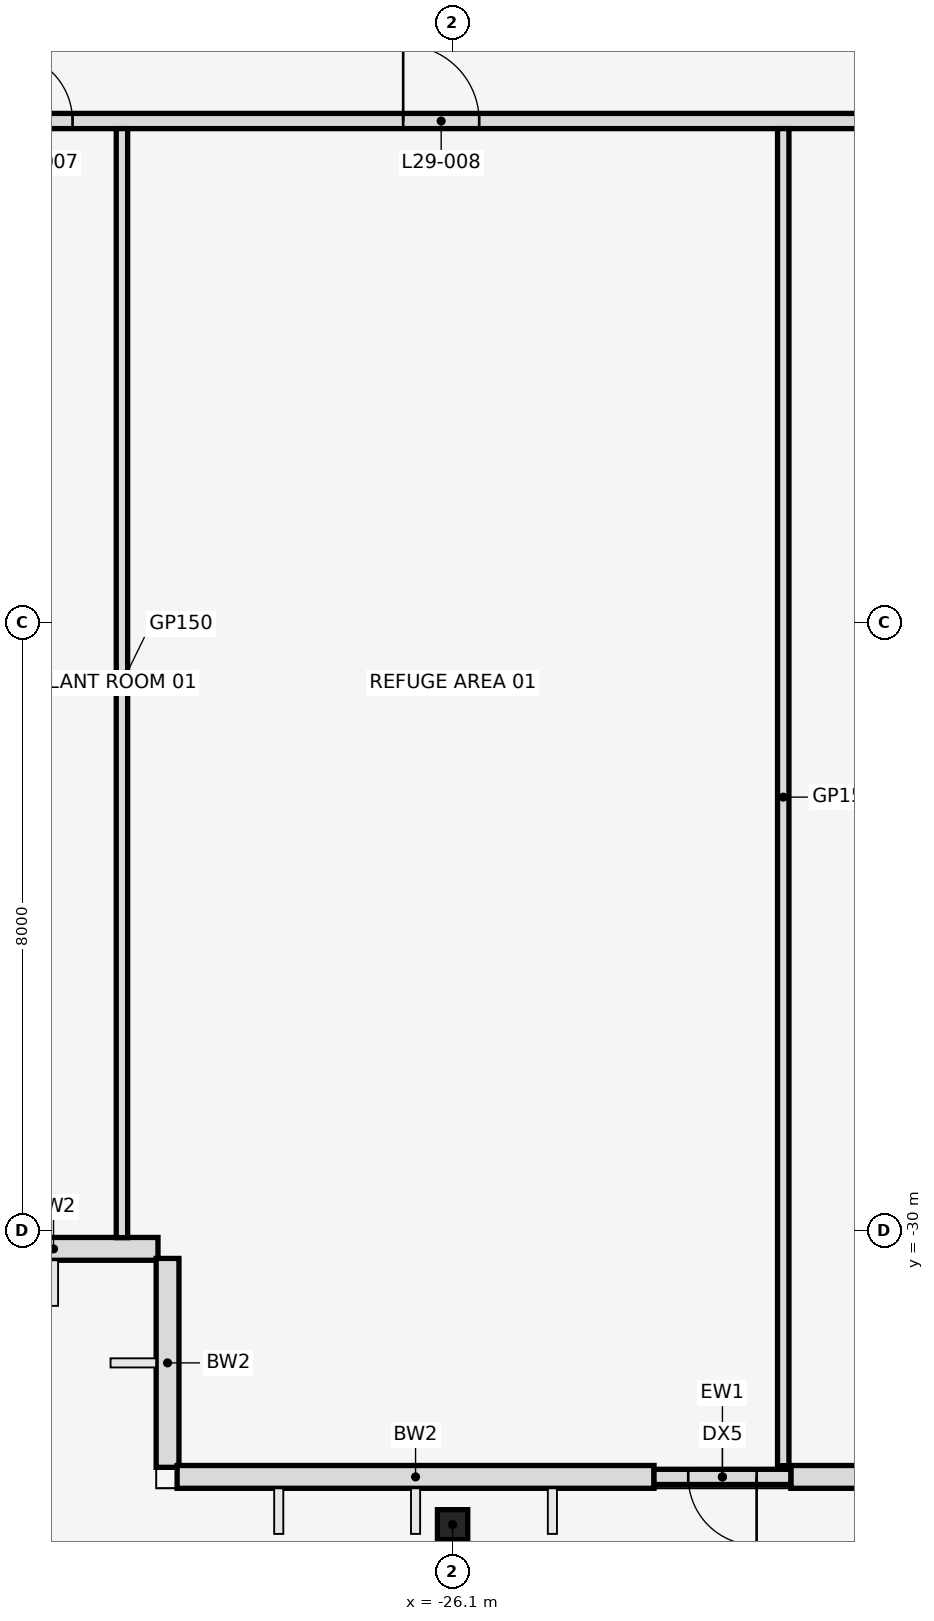
"""IFC4 building model, lengths in metres.
Left out: names, types, materials, properties, quantities, classifications, styles, units other than length and angle.
Written with IfcOpenShell. Run it as: python <this file> out.ifc"""

import sys

from ifc_helpers import new_model, si_unit, direction, frame, frame_2d, origin, origin_2d, place, context, subcontext, project, spatial, rectangle, i_section, extrude, element, fill, save


model = new_model("IFC4")
c1 = context("Model", 3, precision=1e-05, world=origin(), true_north=direction((0.0, 1.0)))
c2 = subcontext(c1, "Body", "Model", "MODEL_VIEW")
j1 = project(units=[si_unit("LENGTHUNIT", "METRE"), si_unit("PLANEANGLEUNIT", "RADIAN")], contexts=[c1])
p1 = place(None, origin())
s1 = spatial("IfcSite", under=j1, at=p1, CompositionType="ELEMENT")
p2 = place(p1, origin())
s2 = spatial("IfcBuilding", under=s1, at=p2, CompositionType="ELEMENT")
p3 = place(p2, frame((0.0, 0.0, 135.0)))
s3 = spatial("IfcBuildingStorey", under=s2, at=p3, CompositionType="ELEMENT", Elevation=135.0)
p4 = place(p3, frame((-26.1, -33.866, 0.0), z_axis=(0.0, 0.0, 1.0), x_axis=(1.0, 0.0, 0.0)))
e1 = element("IfcColumn", 1, at=p4, inside=s3, PredefinedType="COLUMN", context=c2, shape_type="SweptSolid", body=[
    extrude(i_section(OverallWidth=0.399, OverallDepth=0.394, WebThickness=0.023, FlangeThickness=0.037, at=origin_2d()), origin(), (0.0, 0.0, 1.0), 5.4),
])
p5 = place(p3, frame((-32.724, -30.238, 0.0), z_axis=(0.0, 0.0, 1.0), x_axis=(1.0, 0.0, 0.0)))
e2 = element("IfcWall", 2, at=p5, inside=s3, PredefinedType="STANDARD", context=c2, shape_type="SweptSolid", body=[
    extrude(rectangle(XDim=2.748, YDim=0.3, at=frame_2d((1.374, 0.0))), origin(), (0.0, 0.0, 1.0), 4.28),
])
p6 = place(p3, frame((-29.85, -30.364, 0.0), z_axis=(0.0, 0.0, 1.0), x_axis=(0.0, -1.0, 0.0)))
e3 = element("IfcWall", 3, at=p6, inside=s3, PredefinedType="STANDARD", context=c2, shape_type="SweptSolid", body=[
    extrude(rectangle(XDim=2.748, YDim=0.3, at=frame_2d((1.374, 0.0))), origin(), (0.0, 0.0, 1.0), 4.28),
])
p7 = place(p3, frame((-29.724, -33.238, 0.0), z_axis=(0.0, 0.0, 1.0), x_axis=(1.0, 0.0, 0.0)))
e4 = element("IfcWall", 4, at=p7, inside=s3, PredefinedType="STANDARD", context=c2, shape_type="SweptSolid", body=[
    extrude(rectangle(XDim=6.274, YDim=0.3, at=frame_2d((3.137, 0.0))), origin(), (0.0, 0.0, 1.0), 4.28),
])
p8 = place(p3, frame((-21.65, -33.238, 0.0), z_axis=(0.0, 0.0, 1.0), x_axis=(1.0, 0.0, 0.0)))
e5 = element("IfcWall", 5, at=p8, inside=s3, PredefinedType="STANDARD", context=c2, shape_type="SweptSolid", body=[
    extrude(rectangle(XDim=6.035, YDim=0.3, at=frame_2d((3.018, 0.0))), origin(), (0.0, 0.0, 1.0), 4.28),
])
p9 = place(p3, frame((-21.65, -33.238, 0.0), z_axis=(0.0, 0.0, 1.0), x_axis=(-1.0, 0.0, 0.0)))
e6 = element("IfcWall", 6, at=p9, inside=s3, PredefinedType="STANDARD", context=c2, shape_type="SweptSolid", body=[
    extrude(rectangle(XDim=1.8, YDim=0.2, at=frame_2d((0.9, 0.0))), origin(), (0.0, 0.0, 1.0), 5.25),
])
p10 = place(p9, frame((0.45, 0.0, 0.0)))
e7 = element("IfcOpeningElement", 7, at=p10, cuts=e6, PredefinedType="OPENING", context=c2, shape_type="SweptSolid", body=[
    extrude(rectangle(XDim=0.9, YDim=2.1, at=frame_2d((0.45, 1.05))), frame((0.0, 0.112, 0.0), z_axis=(0.0, -1.0, 0.0), x_axis=(1.0, 0.0, 0.0)), (0.0, 0.0, 1.0), 0.224),
])
p11 = place(p3, frame((-32.7, -15.4, 0.0), z_axis=(0.0, 0.0, 1.0), x_axis=(1.0, 0.0, 0.0)))
e8 = element("IfcWall", 8, at=p11, inside=s3, PredefinedType="PARTITIONING", context=c2, shape_type="SweptSolid", body=[
    extrude(rectangle(XDim=65.4, YDim=0.2, at=frame_2d((32.7, 0.0))), origin(), (0.0, 0.0, 1.0), 4.24),
])
p12 = place(p11, frame((0.7, 0.0, 0.0)))
e9 = element("IfcOpeningElement", 9, at=p12, cuts=e8, PredefinedType="OPENING", context=c2, shape_type="SweptSolid", body=[
    extrude(rectangle(XDim=0.9, YDim=2.1, at=frame_2d((0.45, 1.05))), frame((0.0, 0.112, 0.0), z_axis=(0.0, -1.0, 0.0), x_axis=(1.0, 0.0, 0.0)), (0.0, 0.0, 1.0), 0.224),
])
p13 = place(p11, frame((5.95, 0.0, 0.0)))
e10 = element("IfcOpeningElement", 10, at=p13, cuts=e8, PredefinedType="OPENING", context=c2, shape_type="SweptSolid", body=[
    extrude(rectangle(XDim=1.0, YDim=2.1, at=frame_2d((0.5, 1.05))), frame((0.0, 0.112, 0.0), z_axis=(0.0, -1.0, 0.0), x_axis=(1.0, 0.0, 0.0)), (0.0, 0.0, 1.0), 0.224),
])
p14 = place(p11, frame((14.85, 0.0, 0.0)))
e11 = element("IfcOpeningElement", 11, at=p14, cuts=e8, PredefinedType="OPENING", context=c2, shape_type="SweptSolid", body=[
    extrude(rectangle(XDim=1.0, YDim=2.1, at=frame_2d((0.5, 1.05))), frame((0.0, 0.112, 0.0), z_axis=(0.0, -1.0, 0.0), x_axis=(1.0, 0.0, 0.0)), (0.0, 0.0, 1.0), 0.224),
])
p15 = place(p11, frame((23.55, 0.0, 0.0)))
e12 = element("IfcOpeningElement", 12, at=p15, cuts=e8, PredefinedType="OPENING", context=c2, shape_type="SweptSolid", body=[
    extrude(rectangle(XDim=1.0, YDim=2.1, at=frame_2d((0.5, 1.05))), frame((0.0, 0.112, 0.0), z_axis=(0.0, -1.0, 0.0), x_axis=(1.0, 0.0, 0.0)), (0.0, 0.0, 1.0), 0.224),
])
p16 = place(p11, frame((34.4, 0.0, 0.0)))
e13 = element("IfcOpeningElement", 13, at=p16, cuts=e8, PredefinedType="OPENING", context=c2, shape_type="SweptSolid", body=[
    extrude(rectangle(XDim=1.0, YDim=2.1, at=frame_2d((0.5, 1.05))), frame((0.0, 0.112, 0.0), z_axis=(0.0, -1.0, 0.0), x_axis=(1.0, 0.0, 0.0)), (0.0, 0.0, 1.0), 0.224),
])
p17 = place(p11, frame((40.95, 0.0, 0.0)))
e14 = element("IfcOpeningElement", 14, at=p17, cuts=e8, PredefinedType="OPENING", context=c2, shape_type="SweptSolid", body=[
    extrude(rectangle(XDim=1.0, YDim=2.1, at=frame_2d((0.5, 1.05))), frame((0.0, 0.112, 0.0), z_axis=(0.0, -1.0, 0.0), x_axis=(1.0, 0.0, 0.0)), (0.0, 0.0, 1.0), 0.224),
])
p18 = place(p11, frame((49.65, 0.0, 0.0)))
e15 = element("IfcOpeningElement", 15, at=p18, cuts=e8, PredefinedType="OPENING", context=c2, shape_type="SweptSolid", body=[
    extrude(rectangle(XDim=0.9, YDim=2.1, at=frame_2d((0.45, 1.05))), frame((0.0, 0.112, 0.0), z_axis=(0.0, -1.0, 0.0), x_axis=(1.0, 0.0, 0.0)), (0.0, 0.0, 1.0), 0.224),
])
p19 = place(p11, frame((58.45, 0.0, 0.0)))
e16 = element("IfcOpeningElement", 16, at=p19, cuts=e8, PredefinedType="OPENING", context=c2, shape_type="SweptSolid", body=[
    extrude(rectangle(XDim=1.0, YDim=2.1, at=frame_2d((0.5, 1.05))), frame((0.0, 0.112, 0.0), z_axis=(0.0, -1.0, 0.0), x_axis=(1.0, 0.0, 0.0)), (0.0, 0.0, 1.0), 0.224),
])
p20 = place(p11, frame((63.85, 0.0, 0.0)))
e17 = element("IfcOpeningElement", 17, at=p20, cuts=e8, PredefinedType="OPENING", context=c2, shape_type="SweptSolid", body=[
    extrude(rectangle(XDim=0.9, YDim=2.1, at=frame_2d((0.45, 1.05))), frame((0.0, 0.112, 0.0), z_axis=(0.0, -1.0, 0.0), x_axis=(1.0, 0.0, 0.0)), (0.0, 0.0, 1.0), 0.224),
])
p21 = place(p3, frame((-30.45, -30.09, 0.0), z_axis=(0.0, 0.0, 1.0), x_axis=(0.0, 1.0, 0.0)))
e18 = element("IfcWall", 18, at=p21, inside=s3, PredefinedType="PARTITIONING", context=c2, shape_type="SweptSolid", body=[
    extrude(rectangle(XDim=14.59, YDim=0.15, at=frame_2d((7.295, 0.0))), origin(), (0.0, 0.0, 1.0), 4.24),
])
p22 = place(p3, frame((-21.75, -33.09, 0.0), z_axis=(0.0, 0.0, 1.0), x_axis=(0.0, 1.0, 0.0)))
e19 = element("IfcWall", 19, at=p22, inside=s3, PredefinedType="PARTITIONING", context=c2, shape_type="SweptSolid", body=[
    extrude(rectangle(XDim=17.59, YDim=0.15, at=frame_2d((8.795, 0.0))), origin(), (0.0, 0.0, 1.0), 4.24),
])
p23 = place(p10, origin())
e20 = element("IfcDoor", 20, at=p23, inside=s3, OperationType="SINGLE_SWING_LEFT", PredefinedType="DOOR", context=c2, shape_type="SweptSolid", body=[
    extrude(rectangle(XDim=0.9, YDim=2.1, at=frame_2d((0.45, 1.05))), frame((0.0, 0.025, 0.0), z_axis=(0.0, -1.0, 0.0), x_axis=(1.0, 0.0, 0.0)), (0.0, 0.0, 1.0), 0.05),
])
fill(e7, e20)
p24 = place(p12, frame((0.9, 0.0, 0.0), z_axis=(0.0, 0.0, 1.0), x_axis=(-1.0, 0.0, 0.0)))
e21 = element("IfcDoor", 21, at=p24, inside=s3, OperationType="SINGLE_SWING_LEFT", PredefinedType="DOOR", context=c2, shape_type="SweptSolid", body=[
    extrude(rectangle(XDim=0.9, YDim=2.1, at=frame_2d((0.45, 1.05))), frame((0.0, 0.025, 0.0), z_axis=(0.0, -1.0, 0.0), x_axis=(1.0, 0.0, 0.0)), (0.0, 0.0, 1.0), 0.05),
])
fill(e9, e21)
p25 = place(p13, frame((1.0, 0.0, 0.0), z_axis=(0.0, 0.0, 1.0), x_axis=(-1.0, 0.0, 0.0)))
e22 = element("IfcDoor", 22, at=p25, inside=s3, OperationType="SINGLE_SWING_RIGHT", PredefinedType="DOOR", context=c2, shape_type="SweptSolid", body=[
    extrude(rectangle(XDim=1.0, YDim=2.1, at=frame_2d((0.5, 1.05))), frame((0.0, 0.025, 0.0), z_axis=(0.0, -1.0, 0.0), x_axis=(1.0, 0.0, 0.0)), (0.0, 0.0, 1.0), 0.05),
])
fill(e10, e22)
save(model, sys.argv[1])
